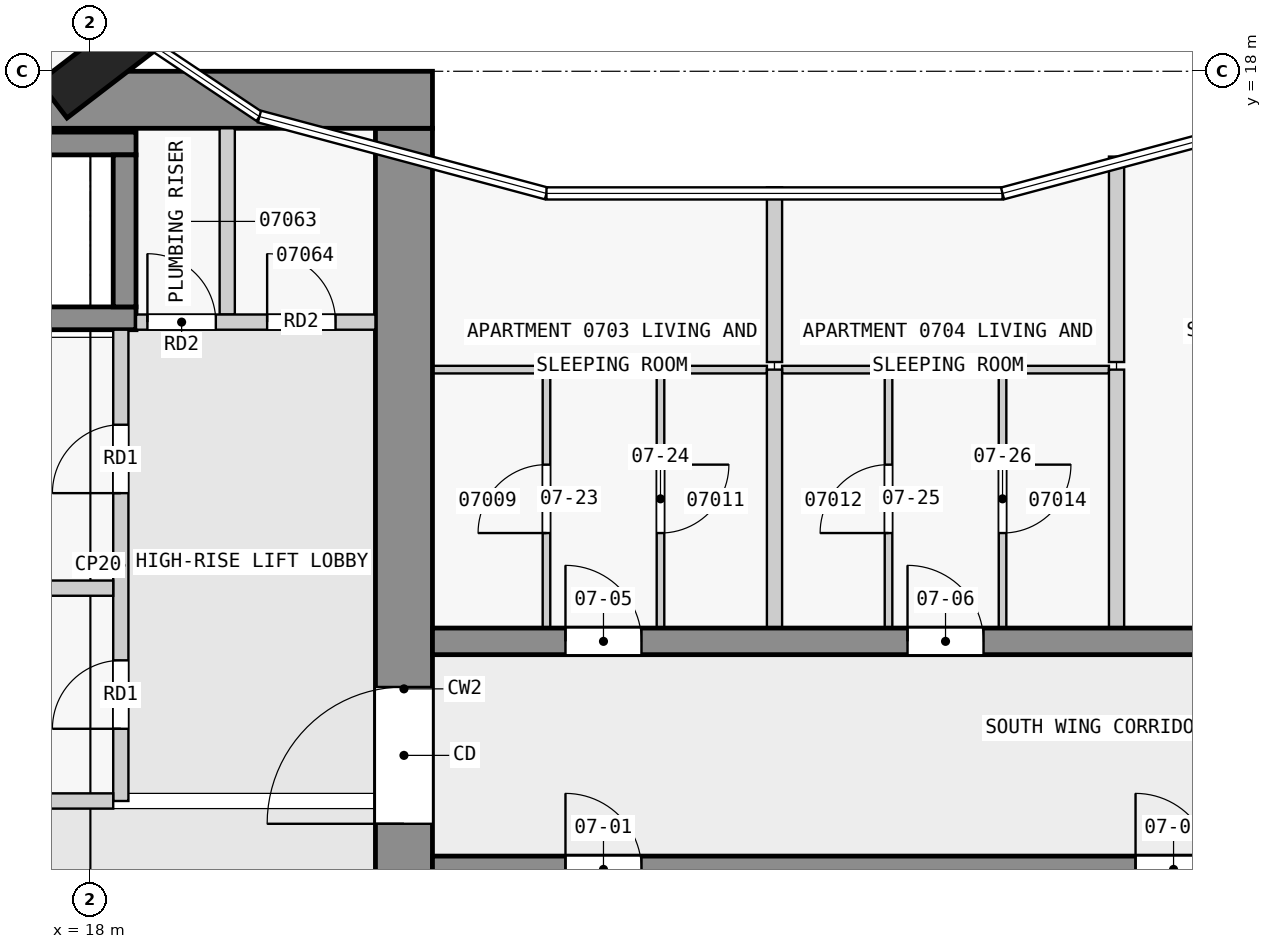
"""IFC4 building model, lengths in metres.
Left out: names, types, materials, properties, quantities, classifications, styles, units other than length and angle.
Written with IfcOpenShell. Run it as: python <this file> out.ifc"""

import sys

from ifc_helpers import new_model, si_unit, direction, frame, frame_2d, origin, origin_2d, place, context, subcontext, project, spatial, rectangle, extrude, element, fill, save


model = new_model("IFC4")
c1 = context("Model", 3, precision=1e-05, world=origin(), true_north=direction((0.0, 1.0)))
c2 = subcontext(c1, "Body", "Model", "MODEL_VIEW")
j1 = project(units=[si_unit("LENGTHUNIT", "METRE"), si_unit("PLANEANGLEUNIT", "RADIAN")], contexts=[c1])
p1 = place(None, origin())
s1 = spatial("IfcSite", under=j1, at=p1, CompositionType="ELEMENT")
p2 = place(p1, origin())
s2 = spatial("IfcBuilding", under=s1, at=p2, CompositionType="ELEMENT")
p3 = place(p2, frame((0.0, 0.0, 33.8)))
s3 = spatial("IfcBuildingStorey", under=s2, at=p3, CompositionType="ELEMENT", Elevation=33.8)
p4 = place(p3, frame((18.065, 18.05, 0.0), z_axis=(0.0, 0.0, 1.0), x_axis=(-0.608810846443, 0.793315418515, 0.0)))
e1 = element("IfcColumn", 1, at=p4, inside=s3, PredefinedType="COLUMN", context=c2, shape_type="SweptSolid", body=[
    extrude(rectangle(XDim=0.6, YDim=1.4, at=origin_2d()), origin(), (0.0, 0.0, 1.0), 3.5),
])
p5 = place(p3, frame((1.55, 17.625, 0.0), z_axis=(0.0, 0.0, 1.0), x_axis=(1.0, 0.0, 0.0)))
e2 = element("IfcWall", 2, at=p5, inside=s3, PredefinedType="SHEAR", context=c2, shape_type="SweptSolid", body=[
    extrude(rectangle(XDim=20.95, YDim=0.75, at=frame_2d((10.475, 0.0))), origin(), (0.0, 0.0, 1.0), 3.25),
])
p6 = place(p5, frame((6.55, 0.0, 0.0)))
e3 = element("IfcOpeningElement", 3, at=p6, cuts=e2, PredefinedType="OPENING", context=c2, shape_type="SweptSolid", body=[
    extrude(rectangle(XDim=1.8, YDim=2.1, at=frame_2d((0.9, 1.05))), frame((0.0, 0.385, 0.0), z_axis=(0.0, -1.0, 0.0), x_axis=(1.0, 0.0, 0.0)), (0.0, 0.0, 1.0), 0.77),
])
p7 = place(p3, frame((22.125, 2.5, 0.0), z_axis=(0.0, 0.0, 1.0), x_axis=(0.0, 1.0, 0.0)))
e4 = element("IfcWall", 4, at=p7, inside=s3, PredefinedType="SHEAR", context=c2, shape_type="SweptSolid", body=[
    extrude(rectangle(XDim=14.75, YDim=0.75, at=frame_2d((7.375, 0.0))), origin(), (0.0, 0.0, 1.0), 3.25),
])
p8 = place(p7, frame((5.6, 0.0, 0.0)))
e5 = element("IfcOpeningElement", 5, at=p8, cuts=e4, PredefinedType="OPENING", context=c2, shape_type="SweptSolid", body=[
    extrude(rectangle(XDim=1.8, YDim=2.1, at=frame_2d((0.9, 1.05))), frame((0.0, 0.385, 0.0), z_axis=(0.0, -1.0, 0.0), x_axis=(1.0, 0.0, 0.0)), (0.0, 0.0, 1.0), 0.77),
])
for number, where, z_axis, x_axis in (
    (6, (10.8, 17.05, 0.0), (0.0, 0.0, 1.0), (1.0, 0.0, 0.0)),
    (7, (10.8, 14.75, 0.0), (0.0, 0.0, 1.0), (1.0, 0.0, 0.0)),
):
    element("IfcWall", number, at=place(p3, frame(where, z_axis=z_axis, x_axis=x_axis)), inside=s3, PredefinedType="SHEAR", context=c2, shape_type="SweptSolid", body=[
        extrude(rectangle(XDim=7.8, YDim=0.3, at=frame_2d((3.9, 0.0))), origin(), (0.0, 0.0, 1.0), 3.25),
    ])
p9 = place(p3, frame((18.45, 14.9, 0.0), z_axis=(0.0, 0.0, 1.0), x_axis=(0.0, 1.0, 0.0)))
e8 = element("IfcWall", 8, at=p9, inside=s3, PredefinedType="SHEAR", context=c2, shape_type="SweptSolid", body=[
    extrude(rectangle(XDim=2.0, YDim=0.3, at=frame_2d((1.0, 0.0))), origin(), (0.0, 0.0, 1.0), 3.25),
])
p10 = place(p3, frame((22.5, 7.5, 0.0), z_axis=(0.0, 0.0, 1.0), x_axis=(1.0, 0.0, 0.0)))
e9 = element("IfcWall", 9, at=p10, inside=s3, PredefinedType="SHEAR", context=c2, shape_type="SweptSolid", body=[
    extrude(rectangle(XDim=22.5, YDim=0.35, at=frame_2d((11.25, 0.0))), origin(), (0.0, 0.0, 1.0), 3.25),
])
p11 = place(p10, frame((1.75, 0.0, 0.0)))
e10 = element("IfcOpeningElement", 10, at=p11, cuts=e9, PredefinedType="OPENING", context=c2, shape_type="SweptSolid", body=[
    extrude(rectangle(XDim=1.0, YDim=2.1, at=frame_2d((0.5, 1.05))), frame((0.0, 0.185, 0.0), z_axis=(0.0, -1.0, 0.0), x_axis=(1.0, 0.0, 0.0)), (0.0, 0.0, 1.0), 0.37),
])
p12 = place(p10, frame((9.25, 0.0, 0.0)))
e11 = element("IfcOpeningElement", 11, at=p12, cuts=e9, PredefinedType="OPENING", context=c2, shape_type="SweptSolid", body=[
    extrude(rectangle(XDim=1.0, YDim=2.1, at=frame_2d((0.5, 1.05))), frame((0.0, 0.185, 0.0), z_axis=(0.0, -1.0, 0.0), x_axis=(1.0, 0.0, 0.0)), (0.0, 0.0, 1.0), 0.37),
])
p13 = place(p10, frame((18.75, 0.0, 0.0)))
e12 = element("IfcOpeningElement", 12, at=p13, cuts=e9, PredefinedType="OPENING", context=c2, shape_type="SweptSolid", body=[
    extrude(rectangle(XDim=0.9, YDim=2.1, at=frame_2d((0.45, 1.05))), frame((0.0, 0.185, 0.0), z_axis=(0.0, -1.0, 0.0), x_axis=(1.0, 0.0, 0.0)), (0.0, 0.0, 1.0), 0.37),
])
p14 = place(p10, frame((20.95, 0.0, 0.0)))
e13 = element("IfcOpeningElement", 13, at=p14, cuts=e9, PredefinedType="OPENING", context=c2, shape_type="SweptSolid", body=[
    extrude(rectangle(XDim=1.0, YDim=2.1, at=frame_2d((0.5, 1.05))), frame((0.0, 0.185, 0.0), z_axis=(0.0, -1.0, 0.0), x_axis=(1.0, 0.0, 0.0)), (0.0, 0.0, 1.0), 0.37),
])
p15 = place(p3, frame((22.5, 10.5, 0.0), z_axis=(0.0, 0.0, 1.0), x_axis=(1.0, 0.0, 0.0)))
e14 = element("IfcWall", 14, at=p15, inside=s3, PredefinedType="SHEAR", context=c2, shape_type="SweptSolid", body=[
    extrude(rectangle(XDim=22.5, YDim=0.35, at=frame_2d((11.25, 0.0))), origin(), (0.0, 0.0, 1.0), 3.25),
])
p16 = place(p15, frame((1.75, 0.0, 0.0)))
e15 = element("IfcOpeningElement", 15, at=p16, cuts=e14, PredefinedType="OPENING", context=c2, shape_type="SweptSolid", body=[
    extrude(rectangle(XDim=1.0, YDim=2.1, at=frame_2d((0.5, 1.05))), frame((0.0, 0.185, 0.0), z_axis=(0.0, -1.0, 0.0), x_axis=(1.0, 0.0, 0.0)), (0.0, 0.0, 1.0), 0.37),
])
p17 = place(p15, frame((6.25, 0.0, 0.0)))
e16 = element("IfcOpeningElement", 16, at=p17, cuts=e14, PredefinedType="OPENING", context=c2, shape_type="SweptSolid", body=[
    extrude(rectangle(XDim=1.0, YDim=2.1, at=frame_2d((0.5, 1.05))), frame((0.0, 0.185, 0.0), z_axis=(0.0, -1.0, 0.0), x_axis=(1.0, 0.0, 0.0)), (0.0, 0.0, 1.0), 0.37),
])
p18 = place(p15, frame((10.75, 0.0, 0.0)))
e17 = element("IfcOpeningElement", 17, at=p18, cuts=e14, PredefinedType="OPENING", context=c2, shape_type="SweptSolid", body=[
    extrude(rectangle(XDim=1.0, YDim=2.1, at=frame_2d((0.5, 1.05))), frame((0.0, 0.185, 0.0), z_axis=(0.0, -1.0, 0.0), x_axis=(1.0, 0.0, 0.0)), (0.0, 0.0, 1.0), 0.37),
])
p19 = place(p15, frame((16.85, 0.0, 0.0)))
e18 = element("IfcOpeningElement", 18, at=p19, cuts=e14, PredefinedType="OPENING", context=c2, shape_type="SweptSolid", body=[
    extrude(rectangle(XDim=1.0, YDim=2.1, at=frame_2d((0.5, 1.05))), frame((0.0, 0.185, 0.0), z_axis=(0.0, -1.0, 0.0), x_axis=(1.0, 0.0, 0.0)), (0.0, 0.0, 1.0), 0.37),
])
p20 = place(p3, frame((10.9, 8.4, 0.0), z_axis=(0.0, 0.0, 1.0), x_axis=(1.0, 0.0, 0.0)))
e19 = element("IfcWall", 19, at=p20, inside=s3, PredefinedType="PARTITIONING", context=c2, shape_type="SweptSolid", body=[
    extrude(rectangle(XDim=7.4, YDim=0.2, at=frame_2d((3.7, 0.0))), origin(), (0.0, 0.0, 1.0), 3.25),
])
p21 = place(p3, frame((18.4, 8.4, 0.0), z_axis=(0.0, 0.0, 1.0), x_axis=(0.0, 1.0, 0.0)))
e20 = element("IfcWall", 20, at=p21, inside=s3, PredefinedType="PARTITIONING", context=c2, shape_type="SweptSolid", body=[
    extrude(rectangle(XDim=6.2, YDim=0.2, at=frame_2d((3.1, 0.0))), origin(), (0.0, 0.0, 1.0), 3.25),
])
p22 = place(p21, frame((0.95, 0.0, 0.0)))
e21 = element("IfcOpeningElement", 21, at=p22, cuts=e20, PredefinedType="OPENING", context=c2, shape_type="SweptSolid", body=[
    extrude(rectangle(XDim=0.9, YDim=2.1, at=frame_2d((0.45, 1.05))), frame((0.0, 0.11, 0.0), z_axis=(0.0, -1.0, 0.0), x_axis=(1.0, 0.0, 0.0)), (0.0, 0.0, 1.0), 0.22),
])
p23 = place(p21, frame((4.05, 0.0, 0.0)))
e22 = element("IfcOpeningElement", 22, at=p23, cuts=e20, PredefinedType="OPENING", context=c2, shape_type="SweptSolid", body=[
    extrude(rectangle(XDim=0.9, YDim=2.1, at=frame_2d((0.45, 1.05))), frame((0.0, 0.11, 0.0), z_axis=(0.0, -1.0, 0.0), x_axis=(1.0, 0.0, 0.0)), (0.0, 0.0, 1.0), 0.22),
])
p24 = place(p3, frame((10.9, 11.2, 0.0), z_axis=(0.0, 0.0, 1.0), x_axis=(1.0, 0.0, 0.0)))
e23 = element("IfcWall", 23, at=p24, inside=s3, PredefinedType="PARTITIONING", context=c2, shape_type="SweptSolid", body=[
    extrude(rectangle(XDim=7.4, YDim=0.2, at=frame_2d((3.7, 0.0))), origin(), (0.0, 0.0, 1.0), 3.25),
])
p25 = place(p3, frame((18.6, 14.7, 0.0), z_axis=(0.0, 0.0, 1.0), x_axis=(1.0, 0.0, 0.0)))
e24 = element("IfcWall", 24, at=p25, inside=s3, PredefinedType="PARTITIONING", context=c2, shape_type="SweptSolid", body=[
    extrude(rectangle(XDim=3.15, YDim=0.2, at=frame_2d((1.575, 0.0))), origin(), (0.0, 0.0, 1.0), 3.25),
])
p26 = place(p25, frame((0.15, 0.0, 0.0)))
e25 = element("IfcOpeningElement", 25, at=p26, cuts=e24, PredefinedType="OPENING", context=c2, shape_type="SweptSolid", body=[
    extrude(rectangle(XDim=0.9, YDim=2.1, at=frame_2d((0.45, 1.05))), frame((0.0, 0.11, 0.0), z_axis=(0.0, -1.0, 0.0), x_axis=(1.0, 0.0, 0.0)), (0.0, 0.0, 1.0), 0.22),
])
p27 = place(p25, frame((1.725, 0.0, 0.0)))
e26 = element("IfcOpeningElement", 26, at=p27, cuts=e24, PredefinedType="OPENING", context=c2, shape_type="SweptSolid", body=[
    extrude(rectangle(XDim=0.9, YDim=2.1, at=frame_2d((0.45, 1.05))), frame((0.0, 0.11, 0.0), z_axis=(0.0, -1.0, 0.0), x_axis=(1.0, 0.0, 0.0)), (0.0, 0.0, 1.0), 0.22),
])
p28 = place(p3, frame((19.8, 14.8, 0.0), z_axis=(0.0, 0.0, 1.0), x_axis=(0.0, 1.0, 0.0)))
e27 = element("IfcWall", 27, at=p28, inside=s3, PredefinedType="PARTITIONING", context=c2, shape_type="SweptSolid", body=[
    extrude(rectangle(XDim=2.45, YDim=0.2, at=frame_2d((1.225, 0.0))), origin(), (0.0, 0.0, 1.0), 3.25),
])
p29 = place(p3, frame((23.95, 14.075, 0.0), z_axis=(0.0, 0.0, 1.0), x_axis=(-1.0, 0.0, 0.0)))
e28 = element("IfcWall", 28, at=p29, inside=s3, PredefinedType="PARTITIONING", context=c2, shape_type="SweptSolid", body=[
    extrude(rectangle(XDim=1.45, YDim=0.1, at=frame_2d((0.725, 0.0))), origin(), (0.0, 0.0, 1.0), 3.25),
])
for number, where, z_axis, x_axis in (
    (29, (26.9, 14.075, 0.0), (0.0, 0.0, 1.0), (-1.0, 0.0, 0.0)),
    (30, (28.45, 14.075, 0.0), (0.0, 0.0, 1.0), (-1.0, 0.0, 0.0)),
    (31, (31.4, 14.075, 0.0), (0.0, 0.0, 1.0), (-1.0, 0.0, 0.0)),
):
    element("IfcWall", number, at=place(p3, frame(where, z_axis=z_axis, x_axis=x_axis)), inside=s3, PredefinedType="PARTITIONING", context=c2, shape_type="SweptSolid", body=[
        extrude(rectangle(XDim=1.35, YDim=0.1, at=frame_2d((0.675, 0.0))), origin(), (0.0, 0.0, 1.0), 3.25),
    ])
p30 = place(p3, frame((24.0, 10.675, 0.0), z_axis=(0.0, 0.0, 1.0), x_axis=(0.0, 1.0, 0.0)))
e32 = element("IfcWall", 32, at=p30, inside=s3, PredefinedType="PARTITIONING", context=c2, shape_type="SweptSolid", body=[
    extrude(rectangle(XDim=3.4, YDim=0.1, at=frame_2d((1.7, 0.0))), origin(), (0.0, 0.0, 1.0), 3.25),
])
p31 = place(p30, frame((1.25, 0.0, 0.0)))
e33 = element("IfcOpeningElement", 33, at=p31, cuts=e32, PredefinedType="OPENING", context=c2, shape_type="SweptSolid", body=[
    extrude(rectangle(XDim=0.9, YDim=2.1, at=frame_2d((0.45, 1.05))), frame((0.0, 0.06, 0.0), z_axis=(0.0, -1.0, 0.0), x_axis=(1.0, 0.0, 0.0)), (0.0, 0.0, 1.0), 0.12),
])
p32 = place(p3, frame((25.5, 14.075, 0.0), z_axis=(0.0, 0.0, 1.0), x_axis=(0.0, -1.0, 0.0)))
e34 = element("IfcWall", 34, at=p32, inside=s3, PredefinedType="PARTITIONING", context=c2, shape_type="SweptSolid", body=[
    extrude(rectangle(XDim=3.4, YDim=0.1, at=frame_2d((1.7, 0.0))), origin(), (0.0, 0.0, 1.0), 3.25),
])
p33 = place(p32, frame((1.25, 0.0, 0.0)))
e35 = element("IfcOpeningElement", 35, at=p33, cuts=e34, PredefinedType="OPENING", context=c2, shape_type="SweptSolid", body=[
    extrude(rectangle(XDim=0.9, YDim=2.1, at=frame_2d((0.45, 1.05))), frame((0.0, 0.06, 0.0), z_axis=(0.0, -1.0, 0.0), x_axis=(1.0, 0.0, 0.0)), (0.0, 0.0, 1.0), 0.12),
])
p34 = place(p3, frame((27.0, 16.473, 0.0), z_axis=(0.0, 0.0, 1.0), x_axis=(0.0, -1.0, 0.0)))
e36 = element("IfcWall", 36, at=p34, inside=s3, PredefinedType="PARTITIONING", context=c2, shape_type="SweptSolid", body=[
    extrude(rectangle(XDim=2.298, YDim=0.2, at=frame_2d((1.149, 0.0))), origin(), (0.0, 0.0, 1.0), 3.25),
])
p35 = place(p3, frame((27.0, 10.675, 0.0), z_axis=(0.0, 0.0, 1.0), x_axis=(0.0, 1.0, 0.0)))
e37 = element("IfcWall", 37, at=p35, inside=s3, PredefinedType="PARTITIONING", context=c2, shape_type="SweptSolid", body=[
    extrude(rectangle(XDim=3.4, YDim=0.2, at=frame_2d((1.7, 0.0))), origin(), (0.0, 0.0, 1.0), 3.25),
])
p36 = place(p3, frame((28.5, 10.675, 0.0), z_axis=(0.0, 0.0, 1.0), x_axis=(0.0, 1.0, 0.0)))
e38 = element("IfcWall", 38, at=p36, inside=s3, PredefinedType="PARTITIONING", context=c2, shape_type="SweptSolid", body=[
    extrude(rectangle(XDim=3.4, YDim=0.1, at=frame_2d((1.7, 0.0))), origin(), (0.0, 0.0, 1.0), 3.25),
])
p37 = place(p36, frame((1.25, 0.0, 0.0)))
e39 = element("IfcOpeningElement", 39, at=p37, cuts=e38, PredefinedType="OPENING", context=c2, shape_type="SweptSolid", body=[
    extrude(rectangle(XDim=0.9, YDim=2.1, at=frame_2d((0.45, 1.05))), frame((0.0, 0.06, 0.0), z_axis=(0.0, -1.0, 0.0), x_axis=(1.0, 0.0, 0.0)), (0.0, 0.0, 1.0), 0.12),
])
p38 = place(p3, frame((30.0, 14.075, 0.0), z_axis=(0.0, 0.0, 1.0), x_axis=(0.0, -1.0, 0.0)))
e40 = element("IfcWall", 40, at=p38, inside=s3, PredefinedType="PARTITIONING", context=c2, shape_type="SweptSolid", body=[
    extrude(rectangle(XDim=3.4, YDim=0.1, at=frame_2d((1.7, 0.0))), origin(), (0.0, 0.0, 1.0), 3.25),
])
p39 = place(p38, frame((1.25, 0.0, 0.0)))
e41 = element("IfcOpeningElement", 41, at=p39, cuts=e40, PredefinedType="OPENING", context=c2, shape_type="SweptSolid", body=[
    extrude(rectangle(XDim=0.9, YDim=2.1, at=frame_2d((0.45, 1.05))), frame((0.0, 0.06, 0.0), z_axis=(0.0, -1.0, 0.0), x_axis=(1.0, 0.0, 0.0)), (0.0, 0.0, 1.0), 0.12),
])
p40 = place(p3, frame((31.5, 16.878, 0.0), z_axis=(0.0, 0.0, 1.0), x_axis=(0.0, -1.0, 0.0)))
e42 = element("IfcWall", 42, at=p40, inside=s3, PredefinedType="PARTITIONING", context=c2, shape_type="SweptSolid", body=[
    extrude(rectangle(XDim=2.703, YDim=0.2, at=frame_2d((1.351, 0.0))), origin(), (0.0, 0.0, 1.0), 3.25),
])
p41 = place(p3, frame((31.5, 10.675, 0.0), z_axis=(0.0, 0.0, 1.0), x_axis=(0.0, 1.0, 0.0)))
e43 = element("IfcWall", 43, at=p41, inside=s3, PredefinedType="PARTITIONING", context=c2, shape_type="SweptSolid", body=[
    extrude(rectangle(XDim=3.4, YDim=0.2, at=frame_2d((1.7, 0.0))), origin(), (0.0, 0.0, 1.0), 3.25),
])
p42 = place(p22, origin())
e44 = element("IfcDoor", 44, at=p42, inside=s3, OperationType="SINGLE_SWING_LEFT", PredefinedType="DOOR", context=c2, shape_type="SweptSolid", body=[
    extrude(rectangle(XDim=0.9, YDim=2.1, at=frame_2d((0.45, 1.05))), frame((0.0, 0.025, 0.0), z_axis=(0.0, -1.0, 0.0), x_axis=(1.0, 0.0, 0.0)), (0.0, 0.0, 1.0), 0.05),
])
fill(e21, e44)
p43 = place(p23, origin())
e45 = element("IfcDoor", 45, at=p43, inside=s3, OperationType="SINGLE_SWING_LEFT", PredefinedType="DOOR", context=c2, shape_type="SweptSolid", body=[
    extrude(rectangle(XDim=0.9, YDim=2.1, at=frame_2d((0.45, 1.05))), frame((0.0, 0.025, 0.0), z_axis=(0.0, -1.0, 0.0), x_axis=(1.0, 0.0, 0.0)), (0.0, 0.0, 1.0), 0.05),
])
fill(e22, e45)
p44 = place(p8, origin())
e46 = element("IfcDoor", 46, at=p44, inside=s3, OperationType="DOUBLE_DOOR_SINGLE_SWING", PredefinedType="DOOR", context=c2, shape_type="SweptSolid", body=[
    extrude(rectangle(XDim=1.8, YDim=2.1, at=frame_2d((0.9, 1.05))), frame((0.0, 0.025, 0.0), z_axis=(0.0, -1.0, 0.0), x_axis=(1.0, 0.0, 0.0)), (0.0, 0.0, 1.0), 0.05),
])
fill(e5, e46)
p45 = place(p26, origin())
e47 = element("IfcDoor", 47, at=p45, inside=s3, OperationType="SINGLE_SWING_LEFT", PredefinedType="DOOR", context=c2, shape_type="SweptSolid", body=[
    extrude(rectangle(XDim=0.9, YDim=2.1, at=frame_2d((0.45, 1.05))), frame((0.0, 0.025, 0.0), z_axis=(0.0, -1.0, 0.0), x_axis=(1.0, 0.0, 0.0)), (0.0, 0.0, 1.0), 0.05),
])
fill(e25, e47)
p46 = place(p27, origin())
e48 = element("IfcDoor", 48, at=p46, inside=s3, OperationType="SINGLE_SWING_LEFT", PredefinedType="DOOR", context=c2, shape_type="SweptSolid", body=[
    extrude(rectangle(XDim=0.9, YDim=2.1, at=frame_2d((0.45, 1.05))), frame((0.0, 0.025, 0.0), z_axis=(0.0, -1.0, 0.0), x_axis=(1.0, 0.0, 0.0)), (0.0, 0.0, 1.0), 0.05),
])
fill(e26, e48)
p47 = place(p11, origin())
e49 = element("IfcDoor", 49, at=p47, inside=s3, OperationType="SINGLE_SWING_LEFT", PredefinedType="DOOR", context=c2, shape_type="SweptSolid", body=[
    extrude(rectangle(XDim=1.0, YDim=2.1, at=frame_2d((0.5, 1.05))), frame((0.0, 0.025, 0.0), z_axis=(0.0, -1.0, 0.0), x_axis=(1.0, 0.0, 0.0)), (0.0, 0.0, 1.0), 0.05),
])
fill(e10, e49)
p48 = place(p12, origin())
e50 = element("IfcDoor", 50, at=p48, inside=s3, OperationType="SINGLE_SWING_LEFT", PredefinedType="DOOR", context=c2, shape_type="SweptSolid", body=[
    extrude(rectangle(XDim=1.0, YDim=2.1, at=frame_2d((0.5, 1.05))), frame((0.0, 0.025, 0.0), z_axis=(0.0, -1.0, 0.0), x_axis=(1.0, 0.0, 0.0)), (0.0, 0.0, 1.0), 0.05),
])
fill(e11, e50)
p49 = place(p16, origin())
e51 = element("IfcDoor", 51, at=p49, inside=s3, OperationType="SINGLE_SWING_LEFT", PredefinedType="DOOR", context=c2, shape_type="SweptSolid", body=[
    extrude(rectangle(XDim=1.0, YDim=2.1, at=frame_2d((0.5, 1.05))), frame((0.0, 0.025, 0.0), z_axis=(0.0, -1.0, 0.0), x_axis=(1.0, 0.0, 0.0)), (0.0, 0.0, 1.0), 0.05),
])
fill(e15, e51)
p50 = place(p17, origin())
e52 = element("IfcDoor", 52, at=p50, inside=s3, OperationType="SINGLE_SWING_LEFT", PredefinedType="DOOR", context=c2, shape_type="SweptSolid", body=[
    extrude(rectangle(XDim=1.0, YDim=2.1, at=frame_2d((0.5, 1.05))), frame((0.0, 0.025, 0.0), z_axis=(0.0, -1.0, 0.0), x_axis=(1.0, 0.0, 0.0)), (0.0, 0.0, 1.0), 0.05),
])
fill(e16, e52)
p51 = place(p31, origin())
e53 = element("IfcDoor", 53, at=p51, inside=s3, OperationType="SINGLE_SWING_RIGHT", PredefinedType="DOOR", context=c2, shape_type="SweptSolid", body=[
    extrude(rectangle(XDim=0.9, YDim=2.1, at=frame_2d((0.45, 1.05))), frame((0.0, 0.025, 0.0), z_axis=(0.0, -1.0, 0.0), x_axis=(1.0, 0.0, 0.0)), (0.0, 0.0, 1.0), 0.05),
])
fill(e33, e53)
p52 = place(p33, origin())
e54 = element("IfcDoor", 54, at=p52, inside=s3, OperationType="SINGLE_SWING_RIGHT", PredefinedType="DOOR", context=c2, shape_type="SweptSolid", body=[
    extrude(rectangle(XDim=0.9, YDim=2.1, at=frame_2d((0.45, 1.05))), frame((0.0, 0.025, 0.0), z_axis=(0.0, -1.0, 0.0), x_axis=(1.0, 0.0, 0.0)), (0.0, 0.0, 1.0), 0.05),
])
fill(e35, e54)
p53 = place(p37, origin())
e55 = element("IfcDoor", 55, at=p53, inside=s3, OperationType="SINGLE_SWING_RIGHT", PredefinedType="DOOR", context=c2, shape_type="SweptSolid", body=[
    extrude(rectangle(XDim=0.9, YDim=2.1, at=frame_2d((0.45, 1.05))), frame((0.0, 0.025, 0.0), z_axis=(0.0, -1.0, 0.0), x_axis=(1.0, 0.0, 0.0)), (0.0, 0.0, 1.0), 0.05),
])
fill(e39, e55)
p54 = place(p39, origin())
e56 = element("IfcDoor", 56, at=p54, inside=s3, OperationType="SINGLE_SWING_RIGHT", PredefinedType="DOOR", context=c2, shape_type="SweptSolid", body=[
    extrude(rectangle(XDim=0.9, YDim=2.1, at=frame_2d((0.45, 1.05))), frame((0.0, 0.025, 0.0), z_axis=(0.0, -1.0, 0.0), x_axis=(1.0, 0.0, 0.0)), (0.0, 0.0, 1.0), 0.05),
])
fill(e41, e56)
save(model, sys.argv[1])
